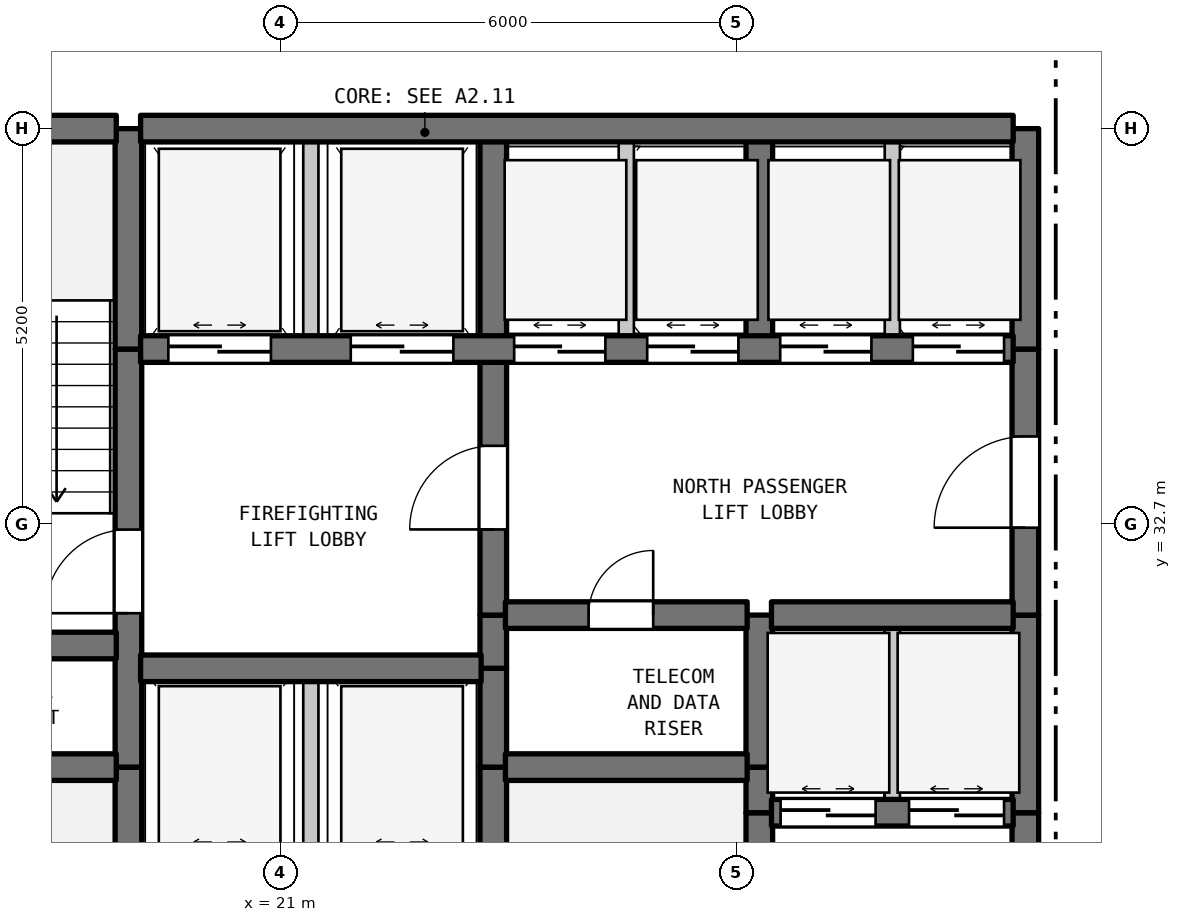
"""IFC4 building model, lengths in metres.
Left out: names, types, materials, properties, quantities, classifications, styles, units other than length and angle.
Written with IfcOpenShell. Run it as: python <this file> out.ifc"""

import sys

from ifc_helpers import new_model, si_unit, direction, frame, frame_2d, origin, place, context, subcontext, project, spatial, rectangle, extrude, element, fill, save


model = new_model("IFC4")
c1 = context("Model", 3, precision=1e-05, world=origin(), true_north=direction((0.0, 1.0)))
c2 = subcontext(c1, "Body", "Model", "MODEL_VIEW")
j1 = project(units=[si_unit("LENGTHUNIT", "METRE"), si_unit("PLANEANGLEUNIT", "RADIAN")], contexts=[c1])
p1 = place(None, origin())
s1 = spatial("IfcSite", under=j1, at=p1, CompositionType="ELEMENT")
p2 = place(p1, origin())
s2 = spatial("IfcBuilding", under=s1, at=p2, CompositionType="ELEMENT")
p3 = place(p2, frame((0.0, 0.0, 73.8)))
s3 = spatial("IfcBuildingStorey", under=s2, at=p3, CompositionType="ELEMENT", Elevation=73.8)
p4 = place(p3, frame((19.0, 28.2, 0.0), z_axis=(0.0, 0.0, 1.0), x_axis=(0.0, 1.0, 0.0)))
e1 = element("IfcWall", 1, at=p4, inside=s3, PredefinedType="SHEAR", context=c2, shape_type="SweptSolid", body=[
    extrude(rectangle(XDim=1.3, YDim=0.35, at=frame_2d((0.65, 0.0))), origin(), (0.0, 0.0, 1.0), 3.385),
])
p5 = place(p3, frame((19.0, 29.5, 0.0), z_axis=(0.0, 0.0, 1.0), x_axis=(0.0, 1.0, 0.0)))
e2 = element("IfcWall", 2, at=p5, inside=s3, PredefinedType="SHEAR", context=c2, shape_type="SweptSolid", body=[
    extrude(rectangle(XDim=5.5, YDim=0.35, at=frame_2d((2.75, 0.0))), origin(), (0.0, 0.0, 1.0), 3.385),
])
p6 = place(p5, frame((2.025, 0.0, 0.0)))
e3 = element("IfcOpeningElement", 3, at=p6, cuts=e2, PredefinedType="OPENING", context=c2, shape_type="SweptSolid", body=[
    extrude(rectangle(XDim=1.1, YDim=2.15, at=frame_2d((0.55, 1.075))), frame((0.0, 0.185, 0.0), z_axis=(0.0, -1.0, 0.0), x_axis=(1.0, 0.0, 0.0)), (0.0, 0.0, 1.0), 0.37),
])
p7 = place(p3, frame((19.0, 35.0, 0.0), z_axis=(0.0, 0.0, 1.0), x_axis=(0.0, 1.0, 0.0)))
e4 = element("IfcWall", 4, at=p7, inside=s3, PredefinedType="SHEAR", context=c2, shape_type="SweptSolid", body=[
    extrude(rectangle(XDim=2.9, YDim=0.35, at=frame_2d((1.45, 0.0))), origin(), (0.0, 0.0, 1.0), 3.385),
])
p8 = place(p3, frame((21.4, 28.2, 0.0), z_axis=(0.0, 0.0, 1.0), x_axis=(0.0, 1.0, 0.0)))
e5 = element("IfcWall", 5, at=p8, inside=s3, PredefinedType="STANDARD", context=c2, shape_type="SweptSolid", body=[
    extrude(rectangle(XDim=2.6, YDim=0.2, at=frame_2d((1.3, 0.0))), origin(), (0.0, 0.0, 1.0), 3.385),
])
p9 = place(p3, frame((21.4, 35.0, 0.0), z_axis=(0.0, 0.0, 1.0), x_axis=(0.0, 1.0, 0.0)))
e6 = element("IfcWall", 6, at=p9, inside=s3, PredefinedType="STANDARD", context=c2, shape_type="SweptSolid", body=[
    extrude(rectangle(XDim=2.9, YDim=0.2, at=frame_2d((1.45, 0.0))), origin(), (0.0, 0.0, 1.0), 3.385),
])
for number, where, z_axis, x_axis in (
    (7, (23.8, 28.2, 0.0), (0.0, 0.0, 1.0), (0.0, 1.0, 0.0)),
    (8, (23.8, 29.5, 0.0), (0.0, 0.0, 1.0), (0.0, 1.0, 0.0)),
):
    element("IfcWall", number, at=place(p3, frame(where, z_axis=z_axis, x_axis=x_axis)), inside=s3, PredefinedType="SHEAR", context=c2, shape_type="SweptSolid", body=[
        extrude(rectangle(XDim=1.3, YDim=0.35, at=frame_2d((0.65, 0.0))), origin(), (0.0, 0.0, 1.0), 3.385),
    ])
p10 = place(p3, frame((23.8, 30.8, 0.0), z_axis=(0.0, 0.0, 1.0), x_axis=(0.0, 1.0, 0.0)))
e9 = element("IfcWall", 9, at=p10, inside=s3, PredefinedType="SHEAR", context=c2, shape_type="SweptSolid", body=[
    extrude(rectangle(XDim=0.7, YDim=0.35, at=frame_2d((0.35, 0.0))), origin(), (0.0, 0.0, 1.0), 3.385),
])
p11 = place(p3, frame((23.8, 31.5, 0.0), z_axis=(0.0, 0.0, 1.0), x_axis=(0.0, 1.0, 0.0)))
e10 = element("IfcWall", 10, at=p11, inside=s3, PredefinedType="SHEAR", context=c2, shape_type="SweptSolid", body=[
    extrude(rectangle(XDim=3.5, YDim=0.35, at=frame_2d((1.75, 0.0))), origin(), (0.0, 0.0, 1.0), 3.385),
])
p12 = place(p11, frame((1.127, 0.0, 0.0)))
e11 = element("IfcOpeningElement", 11, at=p12, cuts=e10, PredefinedType="OPENING", context=c2, shape_type="SweptSolid", body=[
    extrude(rectangle(XDim=1.1, YDim=2.15, at=frame_2d((0.55, 1.075))), frame((0.0, 0.185, 0.0), z_axis=(0.0, -1.0, 0.0), x_axis=(1.0, 0.0, 0.0)), (0.0, 0.0, 1.0), 0.37),
])
p13 = place(p3, frame((23.8, 35.0, 0.0), z_axis=(0.0, 0.0, 1.0), x_axis=(0.0, 1.0, 0.0)))
e12 = element("IfcWall", 12, at=p13, inside=s3, PredefinedType="SHEAR", context=c2, shape_type="SweptSolid", body=[
    extrude(rectangle(XDim=2.9, YDim=0.35, at=frame_2d((1.45, 0.0))), origin(), (0.0, 0.0, 1.0), 3.385),
])
p14 = place(p3, frame((25.55, 35.0, 0.0), z_axis=(0.0, 0.0, 1.0), x_axis=(0.0, 1.0, 0.0)))
e13 = element("IfcWall", 13, at=p14, inside=s3, PredefinedType="STANDARD", context=c2, shape_type="SweptSolid", body=[
    extrude(rectangle(XDim=2.9, YDim=0.2, at=frame_2d((1.45, 0.0))), origin(), (0.0, 0.0, 1.0), 3.385),
])
p15 = place(p3, frame((27.3, 25.6, 0.0), z_axis=(0.0, 0.0, 1.0), x_axis=(0.0, 1.0, 0.0)))
e14 = element("IfcWall", 14, at=p15, inside=s3, PredefinedType="SHEAR", context=c2, shape_type="SweptSolid", body=[
    extrude(rectangle(XDim=3.3, YDim=0.35, at=frame_2d((1.65, 0.0))), origin(), (0.0, 0.0, 1.0), 3.385),
])
p16 = place(p3, frame((27.3, 28.9, 0.0), z_axis=(0.0, 0.0, 1.0), x_axis=(0.0, 1.0, 0.0)))
e15 = element("IfcWall", 15, at=p16, inside=s3, PredefinedType="SHEAR", context=c2, shape_type="SweptSolid", body=[
    extrude(rectangle(XDim=0.6, YDim=0.35, at=frame_2d((0.3, 0.0))), origin(), (0.0, 0.0, 1.0), 3.385),
])
p17 = place(p3, frame((27.3, 29.5, 0.0), z_axis=(0.0, 0.0, 1.0), x_axis=(0.0, 1.0, 0.0)))
e16 = element("IfcWall", 16, at=p17, inside=s3, PredefinedType="SHEAR", context=c2, shape_type="SweptSolid", body=[
    extrude(rectangle(XDim=2.0, YDim=0.35, at=frame_2d((1.0, 0.0))), origin(), (0.0, 0.0, 1.0), 3.385),
])
p18 = place(p3, frame((27.3, 35.0, 0.0), z_axis=(0.0, 0.0, 1.0), x_axis=(0.0, 1.0, 0.0)))
e17 = element("IfcWall", 17, at=p18, inside=s3, PredefinedType="SHEAR", context=c2, shape_type="SweptSolid", body=[
    extrude(rectangle(XDim=2.9, YDim=0.35, at=frame_2d((1.45, 0.0))), origin(), (0.0, 0.0, 1.0), 3.385),
])
p19 = place(p3, frame((29.05, 28.9, 0.0), z_axis=(0.0, 0.0, 1.0), x_axis=(0.0, 1.0, 0.0)))
e18 = element("IfcWall", 18, at=p19, inside=s3, PredefinedType="STANDARD", context=c2, shape_type="SweptSolid", body=[
    extrude(rectangle(XDim=2.6, YDim=0.2, at=frame_2d((1.3, 0.0))), origin(), (0.0, 0.0, 1.0), 3.385),
])
p20 = place(p3, frame((29.05, 35.0, 0.0), z_axis=(0.0, 0.0, 1.0), x_axis=(0.0, 1.0, 0.0)))
e19 = element("IfcWall", 19, at=p20, inside=s3, PredefinedType="STANDARD", context=c2, shape_type="SweptSolid", body=[
    extrude(rectangle(XDim=2.9, YDim=0.2, at=frame_2d((1.45, 0.0))), origin(), (0.0, 0.0, 1.0), 3.385),
])
p21 = place(p3, frame((30.8, 25.6, 0.0), z_axis=(0.0, 0.0, 1.0), x_axis=(0.0, 1.0, 0.0)))
e20 = element("IfcWall", 20, at=p21, inside=s3, PredefinedType="SHEAR", context=c2, shape_type="SweptSolid", body=[
    extrude(rectangle(XDim=3.3, YDim=0.35, at=frame_2d((1.65, 0.0))), origin(), (0.0, 0.0, 1.0), 3.385),
])
p22 = place(p21, frame((0.978, 0.0, 0.0)))
e21 = element("IfcOpeningElement", 21, at=p22, cuts=e20, PredefinedType="OPENING", context=c2, shape_type="SweptSolid", body=[
    extrude(rectangle(XDim=1.2, YDim=2.2, at=frame_2d((0.6, 1.1))), frame((0.0, 0.185, 0.0), z_axis=(0.0, -1.0, 0.0), x_axis=(1.0, 0.0, 0.0)), (0.0, 0.0, 1.0), 0.37),
])
p23 = place(p3, frame((30.8, 28.9, 0.0), z_axis=(0.0, 0.0, 1.0), x_axis=(0.0, 1.0, 0.0)))
e22 = element("IfcWall", 22, at=p23, inside=s3, PredefinedType="SHEAR", context=c2, shape_type="SweptSolid", body=[
    extrude(rectangle(XDim=2.6, YDim=0.35, at=frame_2d((1.3, 0.0))), origin(), (0.0, 0.0, 1.0), 3.385),
])
p24 = place(p3, frame((30.8, 31.5, 0.0), z_axis=(0.0, 0.0, 1.0), x_axis=(0.0, 1.0, 0.0)))
e23 = element("IfcWall", 23, at=p24, inside=s3, PredefinedType="SHEAR", context=c2, shape_type="SweptSolid", body=[
    extrude(rectangle(XDim=3.5, YDim=0.35, at=frame_2d((1.75, 0.0))), origin(), (0.0, 0.0, 1.0), 3.385),
])
p25 = place(p24, frame((1.15, 0.0, 0.0)))
e24 = element("IfcOpeningElement", 24, at=p25, cuts=e23, PredefinedType="OPENING", context=c2, shape_type="SweptSolid", body=[
    extrude(rectangle(XDim=1.2, YDim=2.2, at=frame_2d((0.6, 1.1))), frame((0.0, 0.185, 0.0), z_axis=(0.0, -1.0, 0.0), x_axis=(1.0, 0.0, 0.0)), (0.0, 0.0, 1.0), 0.37),
])
p26 = place(p3, frame((30.8, 35.0, 0.0), z_axis=(0.0, 0.0, 1.0), x_axis=(0.0, 1.0, 0.0)))
e25 = element("IfcWall", 25, at=p26, inside=s3, PredefinedType="SHEAR", context=c2, shape_type="SweptSolid", body=[
    extrude(rectangle(XDim=2.9, YDim=0.35, at=frame_2d((1.45, 0.0))), origin(), (0.0, 0.0, 1.0), 3.385),
])
p27 = place(p3, frame((27.46, 28.9, 0.0), z_axis=(0.0, 0.0, 1.0), x_axis=(1.0, 0.0, 0.0)))
e26 = element("IfcWall", 26, at=p27, inside=s3, PredefinedType="SHEAR", context=c2, shape_type="SweptSolid", body=[
    extrude(rectangle(XDim=3.18, YDim=0.35, at=frame_2d((1.59, 0.0))), origin(), (0.0, 0.0, 1.0), 3.385),
])
p28 = place(p27, frame((0.12, 0.0, 0.0)))
e27 = element("IfcOpeningElement", 27, at=p28, cuts=e26, PredefinedType="OPENING", context=c2, shape_type="SweptSolid", body=[
    extrude(rectangle(XDim=1.25, YDim=2.2, at=frame_2d((0.625, 1.1))), frame((0.0, 0.185, 0.0), z_axis=(0.0, -1.0, 0.0), x_axis=(1.0, 0.0, 0.0)), (0.0, 0.0, 1.0), 0.37),
])
p29 = place(p27, frame((1.81, 0.0, 0.0)))
e28 = element("IfcOpeningElement", 28, at=p29, cuts=e26, PredefinedType="OPENING", context=c2, shape_type="SweptSolid", body=[
    extrude(rectangle(XDim=1.25, YDim=2.2, at=frame_2d((0.625, 1.1))), frame((0.0, 0.185, 0.0), z_axis=(0.0, -1.0, 0.0), x_axis=(1.0, 0.0, 0.0)), (0.0, 0.0, 1.0), 0.37),
])
p30 = place(p3, frame((15.16, 29.5, 0.0), z_axis=(0.0, 0.0, 1.0), x_axis=(1.0, 0.0, 0.0)))
e29 = element("IfcWall", 29, at=p30, inside=s3, PredefinedType="SHEAR", context=c2, shape_type="SweptSolid", body=[
    extrude(rectangle(XDim=3.68, YDim=0.35, at=frame_2d((1.84, 0.0))), origin(), (0.0, 0.0, 1.0), 3.385),
])
p31 = place(p3, frame((23.96, 29.5, 0.0), z_axis=(0.0, 0.0, 1.0), x_axis=(1.0, 0.0, 0.0)))
e30 = element("IfcWall", 30, at=p31, inside=s3, PredefinedType="SHEAR", context=c2, shape_type="SweptSolid", body=[
    extrude(rectangle(XDim=3.18, YDim=0.35, at=frame_2d((1.59, 0.0))), origin(), (0.0, 0.0, 1.0), 3.385),
])
p32 = place(p3, frame((19.16, 30.8, 0.0), z_axis=(0.0, 0.0, 1.0), x_axis=(1.0, 0.0, 0.0)))
e31 = element("IfcWall", 31, at=p32, inside=s3, PredefinedType="SHEAR", context=c2, shape_type="SweptSolid", body=[
    extrude(rectangle(XDim=4.48, YDim=0.35, at=frame_2d((2.24, 0.0))), origin(), (0.0, 0.0, 1.0), 3.385),
])
p33 = place(p3, frame((15.16, 31.1, 0.0), z_axis=(0.0, 0.0, 1.0), x_axis=(1.0, 0.0, 0.0)))
e32 = element("IfcWall", 32, at=p33, inside=s3, PredefinedType="SHEAR", context=c2, shape_type="SweptSolid", body=[
    extrude(rectangle(XDim=3.68, YDim=0.35, at=frame_2d((1.84, 0.0))), origin(), (0.0, 0.0, 1.0), 3.385),
])
p34 = place(p3, frame((23.96, 31.5, 0.0), z_axis=(0.0, 0.0, 1.0), x_axis=(1.0, 0.0, 0.0)))
e33 = element("IfcWall", 33, at=p34, inside=s3, PredefinedType="SHEAR", context=c2, shape_type="SweptSolid", body=[
    extrude(rectangle(XDim=3.18, YDim=0.35, at=frame_2d((1.59, 0.0))), origin(), (0.0, 0.0, 1.0), 3.385),
])
p35 = place(p34, frame((1.094, 0.0, 0.0)))
e34 = element("IfcOpeningElement", 34, at=p35, cuts=e33, PredefinedType="OPENING", context=c2, shape_type="SweptSolid", body=[
    extrude(rectangle(XDim=0.85, YDim=2.1, at=frame_2d((0.425, 1.05))), frame((0.0, 0.185, 0.0), z_axis=(0.0, -1.0, 0.0), x_axis=(1.0, 0.0, 0.0)), (0.0, 0.0, 1.0), 0.37),
])
p36 = place(p3, frame((27.46, 31.5, 0.0), z_axis=(0.0, 0.0, 1.0), x_axis=(1.0, 0.0, 0.0)))
e35 = element("IfcWall", 35, at=p36, inside=s3, PredefinedType="SHEAR", context=c2, shape_type="SweptSolid", body=[
    extrude(rectangle(XDim=3.18, YDim=0.35, at=frame_2d((1.59, 0.0))), origin(), (0.0, 0.0, 1.0), 3.385),
])
p37 = place(p3, frame((19.16, 35.0, 0.0), z_axis=(0.0, 0.0, 1.0), x_axis=(1.0, 0.0, 0.0)))
e36 = element("IfcWall", 36, at=p37, inside=s3, PredefinedType="SHEAR", context=c2, shape_type="SweptSolid", body=[
    extrude(rectangle(XDim=11.48, YDim=0.35, at=frame_2d((5.74, 0.0))), origin(), (0.0, 0.0, 1.0), 3.385),
])
p38 = place(p37, frame((0.365, 0.0, 0.0)))
e37 = element("IfcOpeningElement", 37, at=p38, cuts=e36, PredefinedType="OPENING", context=c2, shape_type="SweptSolid", body=[
    extrude(rectangle(XDim=1.35, YDim=2.2, at=frame_2d((0.675, 1.1))), frame((0.0, 0.185, 0.0), z_axis=(0.0, -1.0, 0.0), x_axis=(1.0, 0.0, 0.0)), (0.0, 0.0, 1.0), 0.37),
])
p39 = place(p37, frame((2.765, 0.0, 0.0)))
e38 = element("IfcOpeningElement", 38, at=p39, cuts=e36, PredefinedType="OPENING", context=c2, shape_type="SweptSolid", body=[
    extrude(rectangle(XDim=1.35, YDim=2.2, at=frame_2d((0.675, 1.1))), frame((0.0, 0.185, 0.0), z_axis=(0.0, -1.0, 0.0), x_axis=(1.0, 0.0, 0.0)), (0.0, 0.0, 1.0), 0.37),
])
p40 = place(p37, frame((4.915, 0.0, 0.0)))
e39 = element("IfcOpeningElement", 39, at=p40, cuts=e36, PredefinedType="OPENING", context=c2, shape_type="SweptSolid", body=[
    extrude(rectangle(XDim=1.2, YDim=2.2, at=frame_2d((0.6, 1.1))), frame((0.0, 0.185, 0.0), z_axis=(0.0, -1.0, 0.0), x_axis=(1.0, 0.0, 0.0)), (0.0, 0.0, 1.0), 0.37),
])
p41 = place(p37, frame((6.665, 0.0, 0.0)))
e40 = element("IfcOpeningElement", 40, at=p41, cuts=e36, PredefinedType="OPENING", context=c2, shape_type="SweptSolid", body=[
    extrude(rectangle(XDim=1.2, YDim=2.2, at=frame_2d((0.6, 1.1))), frame((0.0, 0.185, 0.0), z_axis=(0.0, -1.0, 0.0), x_axis=(1.0, 0.0, 0.0)), (0.0, 0.0, 1.0), 0.37),
])
p42 = place(p37, frame((8.415, 0.0, 0.0)))
e41 = element("IfcOpeningElement", 41, at=p42, cuts=e36, PredefinedType="OPENING", context=c2, shape_type="SweptSolid", body=[
    extrude(rectangle(XDim=1.2, YDim=2.2, at=frame_2d((0.6, 1.1))), frame((0.0, 0.185, 0.0), z_axis=(0.0, -1.0, 0.0), x_axis=(1.0, 0.0, 0.0)), (0.0, 0.0, 1.0), 0.37),
])
p43 = place(p37, frame((10.16, 0.0, 0.0)))
e42 = element("IfcOpeningElement", 42, at=p43, cuts=e36, PredefinedType="OPENING", context=c2, shape_type="SweptSolid", body=[
    extrude(rectangle(XDim=1.2, YDim=2.2, at=frame_2d((0.6, 1.1))), frame((0.0, 0.185, 0.0), z_axis=(0.0, -1.0, 0.0), x_axis=(1.0, 0.0, 0.0)), (0.0, 0.0, 1.0), 0.37),
])
p44 = place(p3, frame((15.16, 37.9, 0.0), z_axis=(0.0, 0.0, 1.0), x_axis=(1.0, 0.0, 0.0)))
e43 = element("IfcWall", 43, at=p44, inside=s3, PredefinedType="SHEAR", context=c2, shape_type="SweptSolid", body=[
    extrude(rectangle(XDim=3.68, YDim=0.35, at=frame_2d((1.84, 0.0))), origin(), (0.0, 0.0, 1.0), 3.385),
])
p45 = place(p3, frame((19.16, 37.9, 0.0), z_axis=(0.0, 0.0, 1.0), x_axis=(1.0, 0.0, 0.0)))
e44 = element("IfcWall", 44, at=p45, inside=s3, PredefinedType="SHEAR", context=c2, shape_type="SweptSolid", body=[
    extrude(rectangle(XDim=11.48, YDim=0.35, at=frame_2d((5.74, 0.0))), origin(), (0.0, 0.0, 1.0), 3.385),
])
p46 = place(p6, origin())
e45 = element("IfcDoor", 45, at=p46, inside=s3, OperationType="SINGLE_SWING_LEFT", PredefinedType="DOOR", context=c2, shape_type="SweptSolid", body=[
    extrude(rectangle(XDim=1.1, YDim=2.15, at=frame_2d((0.55, 1.075))), frame((0.0, 0.025, 0.0), z_axis=(0.0, -1.0, 0.0), x_axis=(1.0, 0.0, 0.0)), (0.0, 0.0, 1.0), 0.05),
])
fill(e3, e45)
p47 = place(p12, origin())
e46 = element("IfcDoor", 46, at=p47, inside=s3, OperationType="SINGLE_SWING_LEFT", PredefinedType="DOOR", context=c2, shape_type="SweptSolid", body=[
    extrude(rectangle(XDim=1.1, YDim=2.15, at=frame_2d((0.55, 1.075))), frame((0.0, 0.025, 0.0), z_axis=(0.0, -1.0, 0.0), x_axis=(1.0, 0.0, 0.0)), (0.0, 0.0, 1.0), 0.05),
])
fill(e11, e46)
p48 = place(p25, origin())
e47 = element("IfcDoor", 47, at=p48, inside=s3, OperationType="SINGLE_SWING_LEFT", PredefinedType="DOOR", context=c2, shape_type="SweptSolid", body=[
    extrude(rectangle(XDim=1.2, YDim=2.2, at=frame_2d((0.6, 1.1))), frame((0.0, 0.025, 0.0), z_axis=(0.0, -1.0, 0.0), x_axis=(1.0, 0.0, 0.0)), (0.0, 0.0, 1.0), 0.05),
])
fill(e24, e47)
p49 = place(p28, origin())
e48 = element("IfcDoor", 48, at=p49, inside=s3, OperationType="DOUBLE_DOOR_SLIDING", PredefinedType="DOOR", context=c2, shape_type="SweptSolid", body=[
    extrude(rectangle(XDim=1.25, YDim=2.2, at=frame_2d((0.625, 1.1))), frame((0.0, 0.025, 0.0), z_axis=(0.0, -1.0, 0.0), x_axis=(1.0, 0.0, 0.0)), (0.0, 0.0, 1.0), 0.05),
])
fill(e27, e48)
p50 = place(p29, origin())
e49 = element("IfcDoor", 49, at=p50, inside=s3, OperationType="DOUBLE_DOOR_SLIDING", PredefinedType="DOOR", context=c2, shape_type="SweptSolid", body=[
    extrude(rectangle(XDim=1.25, YDim=2.2, at=frame_2d((0.625, 1.1))), frame((0.0, 0.025, 0.0), z_axis=(0.0, -1.0, 0.0), x_axis=(1.0, 0.0, 0.0)), (0.0, 0.0, 1.0), 0.05),
])
fill(e28, e49)
p51 = place(p35, origin())
e50 = element("IfcDoor", 50, at=p51, inside=s3, OperationType="SINGLE_SWING_RIGHT", PredefinedType="DOOR", context=c2, shape_type="SweptSolid", body=[
    extrude(rectangle(XDim=0.85, YDim=2.1, at=frame_2d((0.425, 1.05))), frame((0.0, 0.025, 0.0), z_axis=(0.0, -1.0, 0.0), x_axis=(1.0, 0.0, 0.0)), (0.0, 0.0, 1.0), 0.05),
])
fill(e34, e50)
p52 = place(p38, origin())
e51 = element("IfcDoor", 51, at=p52, inside=s3, OperationType="DOUBLE_DOOR_SLIDING", PredefinedType="DOOR", context=c2, shape_type="SweptSolid", body=[
    extrude(rectangle(XDim=1.35, YDim=2.2, at=frame_2d((0.675, 1.1))), frame((0.0, 0.025, 0.0), z_axis=(0.0, -1.0, 0.0), x_axis=(1.0, 0.0, 0.0)), (0.0, 0.0, 1.0), 0.05),
])
fill(e37, e51)
p53 = place(p39, origin())
e52 = element("IfcDoor", 52, at=p53, inside=s3, OperationType="DOUBLE_DOOR_SLIDING", PredefinedType="DOOR", context=c2, shape_type="SweptSolid", body=[
    extrude(rectangle(XDim=1.35, YDim=2.2, at=frame_2d((0.675, 1.1))), frame((0.0, 0.025, 0.0), z_axis=(0.0, -1.0, 0.0), x_axis=(1.0, 0.0, 0.0)), (0.0, 0.0, 1.0), 0.05),
])
fill(e38, e52)
p54 = place(p40, origin())
e53 = element("IfcDoor", 53, at=p54, inside=s3, OperationType="DOUBLE_DOOR_SLIDING", PredefinedType="DOOR", context=c2, shape_type="SweptSolid", body=[
    extrude(rectangle(XDim=1.2, YDim=2.2, at=frame_2d((0.6, 1.1))), frame((0.0, 0.025, 0.0), z_axis=(0.0, -1.0, 0.0), x_axis=(1.0, 0.0, 0.0)), (0.0, 0.0, 1.0), 0.05),
])
fill(e39, e53)
p55 = place(p41, origin())
e54 = element("IfcDoor", 54, at=p55, inside=s3, OperationType="DOUBLE_DOOR_SLIDING", PredefinedType="DOOR", context=c2, shape_type="SweptSolid", body=[
    extrude(rectangle(XDim=1.2, YDim=2.2, at=frame_2d((0.6, 1.1))), frame((0.0, 0.025, 0.0), z_axis=(0.0, -1.0, 0.0), x_axis=(1.0, 0.0, 0.0)), (0.0, 0.0, 1.0), 0.05),
])
fill(e40, e54)
p56 = place(p42, origin())
e55 = element("IfcDoor", 55, at=p56, inside=s3, OperationType="DOUBLE_DOOR_SLIDING", PredefinedType="DOOR", context=c2, shape_type="SweptSolid", body=[
    extrude(rectangle(XDim=1.2, YDim=2.2, at=frame_2d((0.6, 1.1))), frame((0.0, 0.025, 0.0), z_axis=(0.0, -1.0, 0.0), x_axis=(1.0, 0.0, 0.0)), (0.0, 0.0, 1.0), 0.05),
])
fill(e41, e55)
p57 = place(p43, origin())
e56 = element("IfcDoor", 56, at=p57, inside=s3, OperationType="DOUBLE_DOOR_SLIDING", PredefinedType="DOOR", context=c2, shape_type="SweptSolid", body=[
    extrude(rectangle(XDim=1.2, YDim=2.2, at=frame_2d((0.6, 1.1))), frame((0.0, 0.025, 0.0), z_axis=(0.0, -1.0, 0.0), x_axis=(1.0, 0.0, 0.0)), (0.0, 0.0, 1.0), 0.05),
])
fill(e42, e56)
save(model, sys.argv[1])
